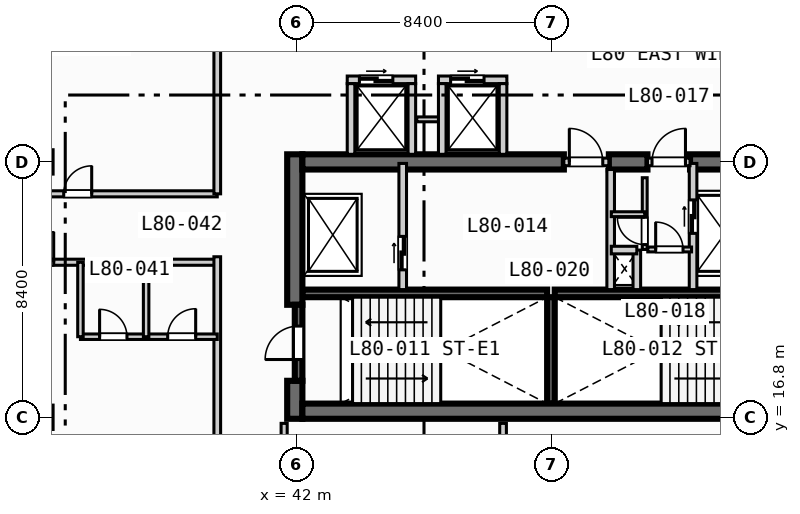
"""IFC4 building model, lengths in metres.
Left out: names, types, materials, properties, quantities, classifications, styles, units other than length and angle.
Written with IfcOpenShell. Run it as: python <this file> out.ifc"""

import sys

from ifc_helpers import new_model, si_unit, direction, frame, frame_2d, origin, place, context, subcontext, project, spatial, rectangle, extrude, element, fill, save


model = new_model("IFC4")
c1 = context("Model", 3, precision=1e-05, world=origin(), true_north=direction((0.0, 1.0)))
c2 = subcontext(c1, "Body", "Model", "MODEL_VIEW")
j1 = project(units=[si_unit("LENGTHUNIT", "METRE"), si_unit("PLANEANGLEUNIT", "RADIAN")], contexts=[c1])
p1 = place(None, origin())
s1 = spatial("IfcSite", under=j1, at=p1, CompositionType="ELEMENT")
p2 = place(p1, origin())
s2 = spatial("IfcBuilding", under=s1, at=p2, CompositionType="ELEMENT")
p3 = place(p2, frame((0.0, 0.0, 324.2)))
s3 = spatial("IfcBuildingStorey", under=s2, at=p3, CompositionType="ELEMENT", Elevation=324.2)
for number, where, z_axis, x_axis in (
    (1, (42.2, 20.875, 0.0), (0.0, 0.0, 1.0), (1.0, 0.0, 0.0)),
    (2, (50.5, 20.875, 0.0), (0.0, 0.0, 1.0), (1.0, 0.0, 0.0)),
):
    element("IfcWall", number, at=place(p3, frame(where, z_axis=z_axis, x_axis=x_axis)), inside=s3, PredefinedType="SOLIDWALL", context=c2, shape_type="SweptSolid", body=[
        extrude(rectangle(XDim=8.05, YDim=0.25, at=frame_2d((4.025, 0.0))), origin(), (0.0, 0.0, 1.0), 3.67),
    ])
p4 = place(p3, frame((50.375, 17.25, 0.0), z_axis=(0.0, 0.0, 1.0), x_axis=(0.0, 1.0, 0.0)))
e3 = element("IfcWall", 3, at=p4, inside=s3, PredefinedType="SOLIDWALL", context=c2, shape_type="SweptSolid", body=[
    extrude(rectangle(XDim=3.5, YDim=0.25, at=frame_2d((1.75, 0.0))), origin(), (0.0, 0.0, 1.0), 3.67),
])
p5 = place(p3, frame((41.95, 16.75, 0.0), z_axis=(0.0, 0.0, 1.0), x_axis=(0.0, 1.0, 0.0)))
e4 = element("IfcWall", 4, at=p5, inside=s3, PredefinedType="SHEAR", context=c2, shape_type="SweptSolid", body=[
    extrude(rectangle(XDim=1.25, YDim=0.5, at=frame_2d((0.625, 0.0))), origin(), (0.0, 0.0, 1.0), 3.67),
])
p6 = place(p3, frame((41.95, 20.5, 0.0), z_axis=(0.0, 0.0, 1.0), x_axis=(0.0, 1.0, 0.0)))
e5 = element("IfcWall", 5, at=p6, inside=s3, PredefinedType="SHEAR", context=c2, shape_type="SweptSolid", body=[
    extrude(rectangle(XDim=4.95, YDim=0.5, at=frame_2d((2.475, 0.0))), origin(), (0.0, 0.0, 1.0), 3.67),
])
p7 = place(p3, frame((42.2, 17.0, 0.0), z_axis=(0.0, 0.0, 1.0), x_axis=(1.0, 0.0, 0.0)))
e6 = element("IfcWall", 6, at=p7, inside=s3, PredefinedType="SHEAR", context=c2, shape_type="SweptSolid", body=[
    extrude(rectangle(XDim=16.35, YDim=0.5, at=frame_2d((8.175, 0.0))), origin(), (0.0, 0.0, 1.0), 3.67),
])
p8 = place(p3, frame((42.2, 25.2, 0.0), z_axis=(0.0, 0.0, 1.0), x_axis=(1.0, 0.0, 0.0)))
e7 = element("IfcWall", 7, at=p8, inside=s3, PredefinedType="SHEAR", context=c2, shape_type="SweptSolid", body=[
    extrude(rectangle(XDim=8.6, YDim=0.5, at=frame_2d((4.3, 0.0))), origin(), (0.0, 0.0, 1.0), 3.67),
])
p9 = place(p3, frame((52.28, 25.2, 0.0), z_axis=(0.0, 0.0, 1.0), x_axis=(1.0, 0.0, 0.0)))
e8 = element("IfcWall", 8, at=p9, inside=s3, PredefinedType="SHEAR", context=c2, shape_type="SweptSolid", body=[
    extrude(rectangle(XDim=1.27, YDim=0.5, at=frame_2d((0.635, 0.0))), origin(), (0.0, 0.0, 1.0), 3.67),
])
p10 = place(p3, frame((54.95, 25.2, 0.0), z_axis=(0.0, 0.0, 1.0), x_axis=(1.0, 0.0, 0.0)))
e9 = element("IfcWall", 9, at=p10, inside=s3, PredefinedType="SHEAR", context=c2, shape_type="SweptSolid", body=[
    extrude(rectangle(XDim=3.6, YDim=0.5, at=frame_2d((1.8, 0.0))), origin(), (0.0, 0.0, 1.0), 3.67),
])
p11 = place(p3, frame((42.075, 18.0, 0.0), z_axis=(0.0, 0.0, 1.0), x_axis=(0.0, 1.0, 0.0)))
e10 = element("IfcWall", 10, at=p11, inside=s3, PredefinedType="SOLIDWALL", context=c2, shape_type="SweptSolid", body=[
    extrude(rectangle(XDim=2.5, YDim=0.25, at=frame_2d((1.25, 0.0))), origin(), (0.0, 0.0, 1.0), 3.67),
])
p12 = place(p11, frame((0.7, 0.0, 0.0)))
e11 = element("IfcOpeningElement", 11, at=p12, cuts=e10, PredefinedType="OPENING", context=c2, shape_type="SweptSolid", body=[
    extrude(rectangle(XDim=1.1, YDim=2.15, at=frame_2d((0.55, 1.075))), frame((0.0, 0.135, 0.0), z_axis=(0.0, -1.0, 0.0), x_axis=(1.0, 0.0, 0.0)), (0.0, 0.0, 1.0), 0.27),
])
p13 = place(p3, frame((45.5, 21.0, 0.0), z_axis=(0.0, 0.0, 1.0), x_axis=(0.0, 1.0, 0.0)))
e12 = element("IfcWall", 12, at=p13, inside=s3, PredefinedType="SOLIDWALL", context=c2, shape_type="SweptSolid", body=[
    extrude(rectangle(XDim=4.15, YDim=0.25, at=frame_2d((2.075, 0.0))), origin(), (0.0, 0.0, 1.0), 3.67),
])
p14 = place(p13, frame((0.65, 0.0, 0.0)))
e13 = element("IfcOpeningElement", 13, at=p14, cuts=e12, PredefinedType="OPENING", context=c2, shape_type="SweptSolid", body=[
    extrude(rectangle(XDim=1.1, YDim=2.15, at=frame_2d((0.55, 1.075))), frame((0.0, 0.135, 0.0), z_axis=(0.0, -1.0, 0.0), x_axis=(1.0, 0.0, 0.0)), (0.0, 0.0, 1.0), 0.27),
])
p15 = place(p3, frame((50.8, 25.2, 0.0), z_axis=(0.0, 0.0, 1.0), x_axis=(1.0, 0.0, 0.0)))
e14 = element("IfcWall", 14, at=p15, inside=s3, PredefinedType="SOLIDWALL", context=c2, shape_type="SweptSolid", body=[
    extrude(rectangle(XDim=1.48, YDim=0.25, at=frame_2d((0.74, 0.0))), origin(), (0.0, 0.0, 1.0), 3.67),
])
p16 = place(p15, frame((0.18, 0.0, 0.0)))
e15 = element("IfcOpeningElement", 15, at=p16, cuts=e14, PredefinedType="OPENING", context=c2, shape_type="SweptSolid", body=[
    extrude(rectangle(XDim=1.1, YDim=2.15, at=frame_2d((0.55, 1.075))), frame((0.0, 0.135, 0.0), z_axis=(0.0, -1.0, 0.0), x_axis=(1.0, 0.0, 0.0)), (0.0, 0.0, 1.0), 0.27),
])
p17 = place(p3, frame((52.34, 21.0, 0.0), z_axis=(0.0, 0.0, 1.0), x_axis=(0.0, 1.0, 0.0)))
e16 = element("IfcWall", 16, at=p17, inside=s3, PredefinedType="SOLIDWALL", context=c2, shape_type="SweptSolid", body=[
    extrude(rectangle(XDim=3.95, YDim=0.25, at=frame_2d((1.975, 0.0))), origin(), (0.0, 0.0, 1.0), 3.67),
])
p18 = place(p3, frame((55.05, 21.0, 0.0), z_axis=(0.0, 0.0, 1.0), x_axis=(0.0, 1.0, 0.0)))
e17 = element("IfcWall", 17, at=p18, inside=s3, PredefinedType="SOLIDWALL", context=c2, shape_type="SweptSolid", body=[
    extrude(rectangle(XDim=4.15, YDim=0.25, at=frame_2d((2.075, 0.0))), origin(), (0.0, 0.0, 1.0), 3.67),
])
p19 = place(p18, frame((1.85, 0.0, 0.0)))
e18 = element("IfcOpeningElement", 18, at=p19, cuts=e17, PredefinedType="OPENING", context=c2, shape_type="SweptSolid", body=[
    extrude(rectangle(XDim=1.1, YDim=2.15, at=frame_2d((0.55, 1.075))), frame((0.0, 0.135, 0.0), z_axis=(0.0, -1.0, 0.0), x_axis=(1.0, 0.0, 0.0)), (0.0, 0.0, 1.0), 0.27),
])
p20 = place(p3, frame((53.55, 25.2, 0.0), z_axis=(0.0, 0.0, 1.0), x_axis=(1.0, 0.0, 0.0)))
e19 = element("IfcWall", 19, at=p20, inside=s3, PredefinedType="SOLIDWALL", context=c2, shape_type="SweptSolid", body=[
    extrude(rectangle(XDim=1.4, YDim=0.25, at=frame_2d((0.7, 0.0))), origin(), (0.0, 0.0, 1.0), 3.67),
])
p21 = place(p20, frame((0.15, 0.0, 0.0)))
e20 = element("IfcOpeningElement", 20, at=p21, cuts=e19, PredefinedType="OPENING", context=c2, shape_type="SweptSolid", body=[
    extrude(rectangle(XDim=1.1, YDim=2.15, at=frame_2d((0.55, 1.075))), frame((0.0, 0.135, 0.0), z_axis=(0.0, -1.0, 0.0), x_axis=(1.0, 0.0, 0.0)), (0.0, 0.0, 1.0), 0.27),
])
p22 = place(p3, frame((53.2, 21.0, 0.0), z_axis=(0.0, 0.0, 1.0), x_axis=(0.0, 1.0, 0.0)))
e21 = element("IfcWall", 21, at=p22, inside=s3, PredefinedType="SOLIDWALL", context=c2, shape_type="SweptSolid", body=[
    extrude(rectangle(XDim=1.3, YDim=0.25, at=frame_2d((0.65, 0.0))), origin(), (0.0, 0.0, 1.0), 3.67),
])
p23 = place(p3, frame((52.36, 22.3, 0.0), z_axis=(0.0, 0.0, 1.0), x_axis=(1.0, 0.0, 0.0)))
e22 = element("IfcWall", 22, at=p23, inside=s3, PredefinedType="SOLIDWALL", context=c2, shape_type="SweptSolid", body=[
    extrude(rectangle(XDim=0.84, YDim=0.25, at=frame_2d((0.42, 0.0))), origin(), (0.0, 0.0, 1.0), 3.67),
])
p24 = place(p3, frame((53.56, 22.32, 0.0), z_axis=(0.0, 0.0, 1.0), x_axis=(1.0, 0.0, 0.0)))
e23 = element("IfcWall", 23, at=p24, inside=s3, PredefinedType="PARTITIONING", context=c2, shape_type="SweptSolid", body=[
    extrude(rectangle(XDim=1.44, YDim=0.16, at=frame_2d((0.72, 0.0))), origin(), (0.0, 0.0, 1.0), 3.67),
])
p25 = place(p24, frame((0.26, 0.0, 0.0)))
e24 = element("IfcOpeningElement", 24, at=p25, cuts=e23, PredefinedType="OPENING", context=c2, shape_type="SweptSolid", body=[
    extrude(rectangle(XDim=0.9, YDim=2.1, at=frame_2d((0.45, 1.05))), frame((0.0, 0.09, 0.0), z_axis=(0.0, -1.0, 0.0), x_axis=(1.0, 0.0, 0.0)), (0.0, 0.0, 1.0), 0.18),
])
p26 = place(p3, frame((53.46, 22.32, 0.0), z_axis=(0.0, 0.0, 1.0), x_axis=(0.0, 1.0, 0.0)))
e25 = element("IfcWall", 25, at=p26, inside=s3, PredefinedType="PARTITIONING", context=c2, shape_type="SweptSolid", body=[
    extrude(rectangle(XDim=2.36, YDim=0.16, at=frame_2d((1.18, 0.0))), origin(), (0.0, 0.0, 1.0), 3.67),
])
p27 = place(p26, frame((0.16, 0.0, 0.0)))
e26 = element("IfcOpeningElement", 26, at=p27, cuts=e25, PredefinedType="OPENING", context=c2, shape_type="SweptSolid", body=[
    extrude(rectangle(XDim=0.9, YDim=2.1, at=frame_2d((0.45, 1.05))), frame((0.0, 0.09, 0.0), z_axis=(0.0, -1.0, 0.0), x_axis=(1.0, 0.0, 0.0)), (0.0, 0.0, 1.0), 0.18),
])
p28 = place(p3, frame((52.36, 23.48, 0.0), z_axis=(0.0, 0.0, 1.0), x_axis=(1.0, 0.0, 0.0)))
e27 = element("IfcWall", 27, at=p28, inside=s3, PredefinedType="PARTITIONING", context=c2, shape_type="SweptSolid", body=[
    extrude(rectangle(XDim=1.1, YDim=0.16, at=frame_2d((0.55, 0.0))), origin(), (0.0, 0.0, 1.0), 3.67),
])
p29 = place(p3, frame((43.675, 27.9, 0.0), z_axis=(0.0, 0.0, 1.0), x_axis=(1.0, 0.0, 0.0)))
e28 = element("IfcWall", 28, at=p29, inside=s3, PredefinedType="SOLIDWALL", context=c2, shape_type="SweptSolid", body=[
    extrude(rectangle(XDim=2.25, YDim=0.25, at=frame_2d((1.125, 0.0))), origin(), (0.0, 0.0, 1.0), 3.67),
])
p30 = place(p29, frame((0.4, 0.0, 0.0)))
e29 = element("IfcOpeningElement", 29, at=p30, cuts=e28, PredefinedType="OPENING", context=c2, shape_type="SweptSolid", body=[
    extrude(rectangle(XDim=1.1, YDim=2.15, at=frame_2d((0.55, 1.075))), frame((0.0, 0.135, 0.0), z_axis=(0.0, -1.0, 0.0), x_axis=(1.0, 0.0, 0.0)), (0.0, 0.0, 1.0), 0.27),
])
for number, where, z_axis, x_axis in (
    (30, (43.8, 25.45, 0.0), (0.0, 0.0, 1.0), (0.0, 1.0, 0.0)),
    (31, (45.8, 25.45, 0.0), (0.0, 0.0, 1.0), (0.0, 1.0, 0.0)),
):
    element("IfcWall", number, at=place(p3, frame(where, z_axis=z_axis, x_axis=x_axis)), inside=s3, PredefinedType="SOLIDWALL", context=c2, shape_type="SweptSolid", body=[
        extrude(rectangle(XDim=2.325, YDim=0.25, at=frame_2d((1.163, 0.0))), origin(), (0.0, 0.0, 1.0), 3.67),
    ])
p31 = place(p3, frame((45.96, 26.6, 0.0), z_axis=(0.0, 0.0, 1.0), x_axis=(1.0, 0.0, 0.0)))
e32 = element("IfcWall", 32, at=p31, inside=s3, PredefinedType="PARTITIONING", context=c2, shape_type="SweptSolid", body=[
    extrude(rectangle(XDim=0.88, YDim=0.16, at=frame_2d((0.44, 0.0))), origin(), (0.0, 0.0, 1.0), 3.67),
])
p32 = place(p3, frame((46.675, 27.9, 0.0), z_axis=(0.0, 0.0, 1.0), x_axis=(1.0, 0.0, 0.0)))
e33 = element("IfcWall", 33, at=p32, inside=s3, PredefinedType="SOLIDWALL", context=c2, shape_type="SweptSolid", body=[
    extrude(rectangle(XDim=2.25, YDim=0.25, at=frame_2d((1.125, 0.0))), origin(), (0.0, 0.0, 1.0), 3.67),
])
p33 = place(p32, frame((0.4, 0.0, 0.0)))
e34 = element("IfcOpeningElement", 34, at=p33, cuts=e33, PredefinedType="OPENING", context=c2, shape_type="SweptSolid", body=[
    extrude(rectangle(XDim=1.1, YDim=2.15, at=frame_2d((0.55, 1.075))), frame((0.0, 0.135, 0.0), z_axis=(0.0, -1.0, 0.0), x_axis=(1.0, 0.0, 0.0)), (0.0, 0.0, 1.0), 0.27),
])
for number, where, z_axis, x_axis in (
    (35, (46.8, 25.45, 0.0), (0.0, 0.0, 1.0), (0.0, 1.0, 0.0)),
    (36, (48.8, 25.45, 0.0), (0.0, 0.0, 1.0), (0.0, 1.0, 0.0)),
):
    element("IfcWall", number, at=place(p3, frame(where, z_axis=z_axis, x_axis=x_axis)), inside=s3, PredefinedType="SOLIDWALL", context=c2, shape_type="SweptSolid", body=[
        extrude(rectangle(XDim=2.325, YDim=0.25, at=frame_2d((1.163, 0.0))), origin(), (0.0, 0.0, 1.0), 3.67),
    ])
p34 = place(p3, frame((30.6, 24.15, 0.0), z_axis=(0.0, 0.0, 1.0), x_axis=(1.0, 0.0, 0.0)))
e37 = element("IfcWall", 37, at=p34, inside=s3, PredefinedType="PARTITIONING", context=c2, shape_type="SweptSolid", body=[
    extrude(rectangle(XDim=8.8, YDim=0.2, at=frame_2d((4.4, 0.0))), origin(), (0.0, 0.0, 1.0), 3.67),
])
p35 = place(p34, frame((3.75, 0.0, 0.0)))
e38 = element("IfcOpeningElement", 38, at=p35, cuts=e37, PredefinedType="OPENING", context=c2, shape_type="SweptSolid", body=[
    extrude(rectangle(XDim=0.92, YDim=2.1, at=frame_2d((0.46, 1.05))), frame((0.0, 0.11, 0.0), z_axis=(0.0, -1.0, 0.0), x_axis=(1.0, 0.0, 0.0)), (0.0, 0.0, 1.0), 0.22),
])
p36 = place(p3, frame((39.4, 24.15, 0.0), z_axis=(0.0, 0.0, 1.0), x_axis=(0.0, 1.0, 0.0)))
e39 = element("IfcWall", 39, at=p36, inside=s3, PredefinedType="PARTITIONING", context=c2, shape_type="SweptSolid", body=[
    extrude(rectangle(XDim=9.15, YDim=0.22, at=frame_2d((4.575, 0.0))), origin(), (0.0, 0.0, 1.0), 3.67),
])
p37 = place(p3, frame((41.6, 8.65, 0.0), z_axis=(0.0, 0.0, 1.0), x_axis=(0.0, 1.0, 0.0)))
e40 = element("IfcWall", 40, at=p37, inside=s3, PredefinedType="PARTITIONING", context=c2, shape_type="SweptSolid", body=[
    extrude(rectangle(XDim=7.95, YDim=0.2, at=frame_2d((3.975, 0.0))), origin(), (0.0, 0.0, 1.0), 3.67),
])
p38 = place(p37, frame((2.2, 0.0, 0.0)))
e41 = element("IfcOpeningElement", 41, at=p38, cuts=e40, PredefinedType="OPENING", context=c2, shape_type="SweptSolid", body=[
    extrude(rectangle(XDim=0.92, YDim=2.1, at=frame_2d((0.46, 1.05))), frame((0.0, 0.11, 0.0), z_axis=(0.0, -1.0, 0.0), x_axis=(1.0, 0.0, 0.0)), (0.0, 0.0, 1.0), 0.22),
])
p39 = place(p3, frame((48.8, 8.65, 0.0), z_axis=(0.0, 0.0, 1.0), x_axis=(0.0, 1.0, 0.0)))
e42 = element("IfcWall", 42, at=p39, inside=s3, PredefinedType="PARTITIONING", context=c2, shape_type="SweptSolid", body=[
    extrude(rectangle(XDim=7.95, YDim=0.22, at=frame_2d((3.975, 0.0))), origin(), (0.0, 0.0, 1.0), 3.67),
])
p40 = place(p3, frame((11.8, 21.9, 0.0), z_axis=(0.0, 0.0, 1.0), x_axis=(1.0, 0.0, 0.0)))
e43 = element("IfcWall", 43, at=p40, inside=s3, PredefinedType="PARTITIONING", context=c2, shape_type="SweptSolid", body=[
    extrude(rectangle(XDim=27.6, YDim=0.2, at=frame_2d((13.8, 0.0))), origin(), (0.0, 0.0, 1.0), 3.67),
])
p41 = place(p40, frame((7.42, 0.0, 0.0)))
e44 = element("IfcOpeningElement", 44, at=p41, cuts=e43, PredefinedType="OPENING", context=c2, shape_type="SweptSolid", body=[
    extrude(rectangle(XDim=1.0, YDim=2.15, at=frame_2d((0.5, 1.075))), frame((0.0, 0.11, 0.0), z_axis=(0.0, -1.0, 0.0), x_axis=(1.0, 0.0, 0.0)), (0.0, 0.0, 1.0), 0.22),
])
p42 = place(p40, frame((21.22, 0.0, 0.0)))
e45 = element("IfcOpeningElement", 45, at=p42, cuts=e43, PredefinedType="OPENING", context=c2, shape_type="SweptSolid", body=[
    extrude(rectangle(XDim=1.0, YDim=2.15, at=frame_2d((0.5, 1.075))), frame((0.0, 0.11, 0.0), z_axis=(0.0, -1.0, 0.0), x_axis=(1.0, 0.0, 0.0)), (0.0, 0.0, 1.0), 0.22),
])
p43 = place(p3, frame((39.4, 8.6, 0.0), z_axis=(0.0, 0.0, 1.0), x_axis=(0.0, 1.0, 0.0)))
e46 = element("IfcWall", 46, at=p43, inside=s3, PredefinedType="PARTITIONING", context=c2, shape_type="SweptSolid", body=[
    extrude(rectangle(XDim=13.48, YDim=0.22, at=frame_2d((6.74, 0.0))), origin(), (0.0, 0.0, 1.0), 3.67),
])
p44 = place(p3, frame((34.9, 19.45, 0.0), z_axis=(0.0, 0.0, 1.0), x_axis=(1.0, 0.0, 0.0)))
e47 = element("IfcWall", 47, at=p44, inside=s3, PredefinedType="PLUMBINGWALL", context=c2, shape_type="SweptSolid", body=[
    extrude(rectangle(XDim=4.5, YDim=0.18, at=frame_2d((2.25, 0.0))), origin(), (0.0, 0.0, 1.0), 3.67),
])
p45 = place(p44, frame((0.63, 0.0, 0.0)))
e48 = element("IfcOpeningElement", 48, at=p45, cuts=e47, PredefinedType="OPENING", context=c2, shape_type="SweptSolid", body=[
    extrude(rectangle(XDim=0.9, YDim=2.1, at=frame_2d((0.45, 1.05))), frame((0.0, 0.1, 0.0), z_axis=(0.0, -1.0, 0.0), x_axis=(1.0, 0.0, 0.0)), (0.0, 0.0, 1.0), 0.2),
])
p46 = place(p44, frame((2.87, 0.0, 0.0)))
e49 = element("IfcOpeningElement", 49, at=p46, cuts=e47, PredefinedType="OPENING", context=c2, shape_type="SweptSolid", body=[
    extrude(rectangle(XDim=0.92, YDim=2.1, at=frame_2d((0.46, 1.05))), frame((0.0, 0.1, 0.0), z_axis=(0.0, -1.0, 0.0), x_axis=(1.0, 0.0, 0.0)), (0.0, 0.0, 1.0), 0.2),
])
for number, where, z_axis, x_axis in (
    (50, (34.9, 19.45, 0.0), (0.0, 0.0, 1.0), (0.0, 1.0, 0.0)),
    (51, (37.06, 19.45, 0.0), (0.0, 0.0, 1.0), (0.0, 1.0, 0.0)),
):
    element("IfcWall", number, at=place(p3, frame(where, z_axis=z_axis, x_axis=x_axis)), inside=s3, PredefinedType="PLUMBINGWALL", context=c2, shape_type="SweptSolid", body=[
        extrude(rectangle(XDim=2.45, YDim=0.18, at=frame_2d((1.225, 0.0))), origin(), (0.0, 0.0, 1.0), 3.67),
    ])
p47 = place(p12, origin())
e52 = element("IfcDoor", 52, at=p47, inside=s3, OperationType="SINGLE_SWING_LEFT", PredefinedType="DOOR", context=c2, shape_type="SweptSolid", body=[
    extrude(rectangle(XDim=1.1, YDim=2.15, at=frame_2d((0.55, 1.075))), frame((0.0, 0.025, 0.0), z_axis=(0.0, -1.0, 0.0), x_axis=(1.0, 0.0, 0.0)), (0.0, 0.0, 1.0), 0.05),
])
fill(e11, e52)
p48 = place(p14, origin())
e53 = element("IfcDoor", 53, at=p48, inside=s3, OperationType="SLIDING_TO_LEFT", PredefinedType="DOOR", context=c2, shape_type="SweptSolid", body=[
    extrude(rectangle(XDim=1.1, YDim=2.15, at=frame_2d((0.55, 1.075))), frame((0.0, 0.025, 0.0), z_axis=(0.0, -1.0, 0.0), x_axis=(1.0, 0.0, 0.0)), (0.0, 0.0, 1.0), 0.05),
])
fill(e13, e53)
p49 = place(p16, origin())
e54 = element("IfcDoor", 54, at=p49, inside=s3, OperationType="SINGLE_SWING_LEFT", PredefinedType="DOOR", context=c2, shape_type="SweptSolid", body=[
    extrude(rectangle(XDim=1.1, YDim=2.15, at=frame_2d((0.55, 1.075))), frame((0.0, 0.025, 0.0), z_axis=(0.0, -1.0, 0.0), x_axis=(1.0, 0.0, 0.0)), (0.0, 0.0, 1.0), 0.05),
])
fill(e15, e54)
p50 = place(p19, origin())
e55 = element("IfcDoor", 55, at=p50, inside=s3, OperationType="SLIDING_TO_LEFT", PredefinedType="DOOR", context=c2, shape_type="SweptSolid", body=[
    extrude(rectangle(XDim=1.1, YDim=2.15, at=frame_2d((0.55, 1.075))), frame((0.0, 0.025, 0.0), z_axis=(0.0, -1.0, 0.0), x_axis=(1.0, 0.0, 0.0)), (0.0, 0.0, 1.0), 0.05),
])
fill(e18, e55)
p51 = place(p21, origin())
e56 = element("IfcDoor", 56, at=p51, inside=s3, OperationType="SINGLE_SWING_RIGHT", PredefinedType="DOOR", context=c2, shape_type="SweptSolid", body=[
    extrude(rectangle(XDim=1.1, YDim=2.15, at=frame_2d((0.55, 1.075))), frame((0.0, 0.025, 0.0), z_axis=(0.0, -1.0, 0.0), x_axis=(1.0, 0.0, 0.0)), (0.0, 0.0, 1.0), 0.05),
])
fill(e20, e56)
p52 = place(p25, origin())
e57 = element("IfcDoor", 57, at=p52, inside=s3, OperationType="SINGLE_SWING_LEFT", PredefinedType="DOOR", context=c2, shape_type="SweptSolid", body=[
    extrude(rectangle(XDim=0.9, YDim=2.1, at=frame_2d((0.45, 1.05))), frame((0.0, 0.025, 0.0), z_axis=(0.0, -1.0, 0.0), x_axis=(1.0, 0.0, 0.0)), (0.0, 0.0, 1.0), 0.05),
])
fill(e24, e57)
p53 = place(p27, origin())
e58 = element("IfcDoor", 58, at=p53, inside=s3, OperationType="SINGLE_SWING_RIGHT", PredefinedType="DOOR", context=c2, shape_type="SweptSolid", body=[
    extrude(rectangle(XDim=0.9, YDim=2.1, at=frame_2d((0.45, 1.05))), frame((0.0, 0.025, 0.0), z_axis=(0.0, -1.0, 0.0), x_axis=(1.0, 0.0, 0.0)), (0.0, 0.0, 1.0), 0.05),
])
fill(e26, e58)
p54 = place(p30, origin())
e59 = element("IfcDoor", 59, at=p54, inside=s3, OperationType="SLIDING_TO_LEFT", PredefinedType="DOOR", context=c2, shape_type="SweptSolid", body=[
    extrude(rectangle(XDim=1.1, YDim=2.15, at=frame_2d((0.55, 1.075))), frame((0.0, 0.025, 0.0), z_axis=(0.0, -1.0, 0.0), x_axis=(1.0, 0.0, 0.0)), (0.0, 0.0, 1.0), 0.05),
])
fill(e29, e59)
p55 = place(p33, origin())
e60 = element("IfcDoor", 60, at=p55, inside=s3, OperationType="SLIDING_TO_LEFT", PredefinedType="DOOR", context=c2, shape_type="SweptSolid", body=[
    extrude(rectangle(XDim=1.1, YDim=2.15, at=frame_2d((0.55, 1.075))), frame((0.0, 0.025, 0.0), z_axis=(0.0, -1.0, 0.0), x_axis=(1.0, 0.0, 0.0)), (0.0, 0.0, 1.0), 0.05),
])
fill(e34, e60)
p56 = place(p35, origin())
e61 = element("IfcDoor", 61, at=p56, inside=s3, OperationType="SINGLE_SWING_RIGHT", PredefinedType="DOOR", context=c2, shape_type="SweptSolid", body=[
    extrude(rectangle(XDim=0.92, YDim=2.1, at=frame_2d((0.46, 1.05))), frame((0.0, 0.025, 0.0), z_axis=(0.0, -1.0, 0.0), x_axis=(1.0, 0.0, 0.0)), (0.0, 0.0, 1.0), 0.05),
])
fill(e38, e61)
p57 = place(p42, origin())
e62 = element("IfcDoor", 62, at=p57, inside=s3, OperationType="SINGLE_SWING_RIGHT", PredefinedType="DOOR", context=c2, shape_type="SweptSolid", body=[
    extrude(rectangle(XDim=1.0, YDim=2.15, at=frame_2d((0.5, 1.075))), frame((0.0, 0.025, 0.0), z_axis=(0.0, -1.0, 0.0), x_axis=(1.0, 0.0, 0.0)), (0.0, 0.0, 1.0), 0.05),
])
fill(e45, e62)
p58 = place(p45, origin())
e63 = element("IfcDoor", 63, at=p58, inside=s3, OperationType="SINGLE_SWING_LEFT", PredefinedType="DOOR", context=c2, shape_type="SweptSolid", body=[
    extrude(rectangle(XDim=0.9, YDim=2.1, at=frame_2d((0.45, 1.05))), frame((0.0, 0.025, 0.0), z_axis=(0.0, -1.0, 0.0), x_axis=(1.0, 0.0, 0.0)), (0.0, 0.0, 1.0), 0.05),
])
fill(e48, e63)
p59 = place(p46, origin())
e64 = element("IfcDoor", 64, at=p59, inside=s3, OperationType="SINGLE_SWING_RIGHT", PredefinedType="DOOR", context=c2, shape_type="SweptSolid", body=[
    extrude(rectangle(XDim=0.92, YDim=2.1, at=frame_2d((0.46, 1.05))), frame((0.0, 0.025, 0.0), z_axis=(0.0, -1.0, 0.0), x_axis=(1.0, 0.0, 0.0)), (0.0, 0.0, 1.0), 0.05),
])
fill(e49, e64)
save(model, sys.argv[1])
